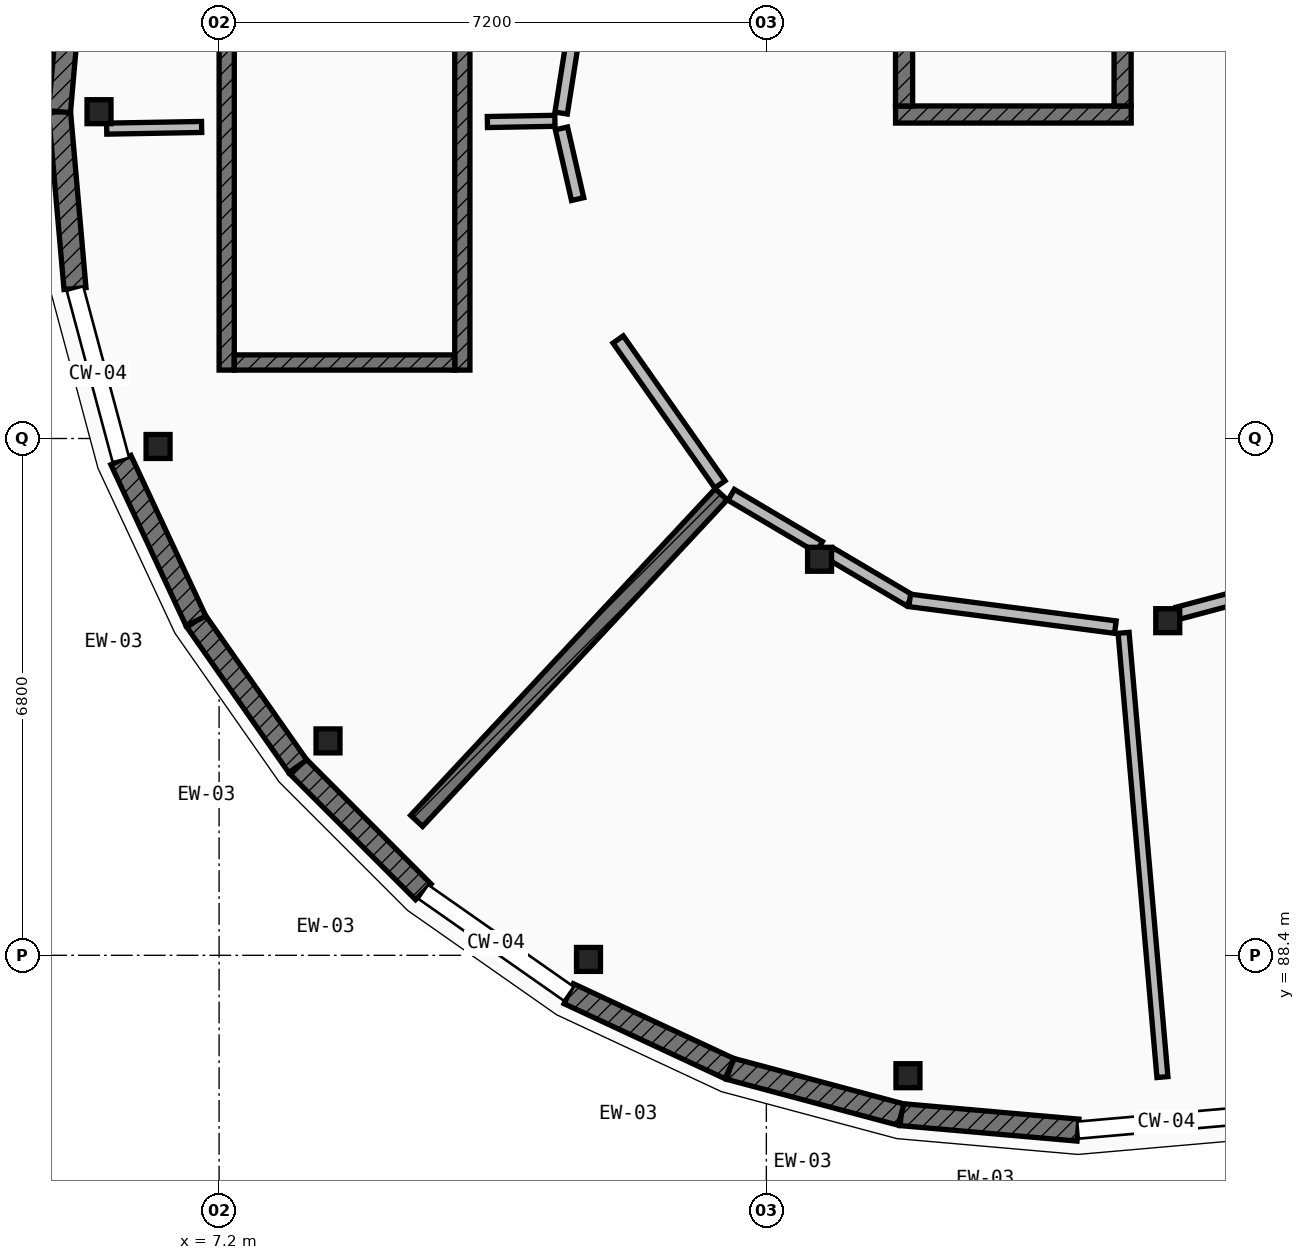
"""IFC4 building model, lengths in metres.
Left out: names, types, materials, properties, quantities, classifications, styles, units other than length and angle.
Written with IfcOpenShell. Run it as: python <this file> out.ifc"""

import sys

from ifc_helpers import new_model, si_unit, direction, frame, frame_2d, origin, origin_2d, place, context, subcontext, project, spatial, rectangle, extrude, element, fill, save


model = new_model("IFC4")
c1 = context("Model", 3, precision=1e-05, world=origin(), true_north=direction((0.0, 1.0)))
c2 = subcontext(c1, "Body", "Model", "MODEL_VIEW")
j1 = project(units=[si_unit("LENGTHUNIT", "METRE"), si_unit("PLANEANGLEUNIT", "RADIAN")], contexts=[c1])
p1 = place(None, origin())
s1 = spatial("IfcSite", under=j1, at=p1, CompositionType="ELEMENT")
p2 = place(p1, origin())
s2 = spatial("IfcBuilding", under=s1, at=p2, CompositionType="ELEMENT")
p3 = place(p2, frame((0.0, 0.0, 12.95)))
s3 = spatial("IfcBuildingStorey", under=s2, at=p3, CompositionType="ELEMENT", Elevation=12.95)
for number, where, z_axis, x_axis in (
    (1, (5.62, 99.5, 0.0), (0.0, 0.0, 1.0), (1.0, 0.0, 0.0)),
    (2, (6.397, 95.095, 0.0), (0.0, 0.0, 1.0), (1.0, 0.0, 0.0)),
    (3, (8.633, 91.221, 0.0), (0.0, 0.0, 1.0), (1.0, 0.0, 0.0)),
    (4, (12.06, 88.346, 0.0), (0.0, 0.0, 1.0), (1.0, 0.0, 0.0)),
    (5, (16.263, 86.816, 0.0), (0.0, 0.0, 1.0), (1.0, 0.0, 0.0)),
    (6, (15.1, 93.611, 0.0), (0.0, 0.0, 1.0), (1.0, 0.0, 0.0)),
    (7, (19.681, 92.803, 0.0), (0.0, 0.0, 1.0), (1.0, 0.0, 0.0)),
):
    element("IfcColumn", number, at=place(p3, frame(where, z_axis=z_axis, x_axis=x_axis)), inside=s3, PredefinedType="COLUMN", context=c2, shape_type="SweptSolid", body=[
        extrude(rectangle(XDim=0.315, YDim=0.315, at=origin_2d()), origin(), (0.0, 0.0, 1.0), 4.2),
    ])
p4 = place(p3, frame((18.5, 86.1, 0.0), z_axis=(0.0, 0.0, 1.0), x_axis=(-0.996184295282, 0.087274565792, 0.0)))
e8 = element("IfcWall", 8, at=p4, inside=s3, PredefinedType="ELEMENTEDWALL", context=c2, shape_type="SweptSolid", body=[
    extrude(rectangle(XDim=2.336, YDim=0.29, at=frame_2d((1.168, 0.0))), origin(), (0.0, 0.0, 1.0), 3.349),
])
p5 = place(p4, frame((0.643, 0.0, 0.85)))
e9 = element("IfcOpeningElement", 9, at=p5, cuts=e8, PredefinedType="OPENING", context=c2, shape_type="SweptSolid", body=[
    extrude(rectangle(XDim=1.05, YDim=2.15, at=frame_2d((0.525, 1.075))), frame((0.0, 0.155, 0.0), z_axis=(0.0, -1.0, 0.0), x_axis=(1.0, 0.0, 0.0)), (0.0, 0.0, 1.0), 0.31),
])
p6 = place(p3, frame((16.173, 86.304, 0.0), z_axis=(0.0, 0.0, 1.0), x_axis=(-0.965981166673, 0.258612423585, 0.0)))
e10 = element("IfcWall", 10, at=p6, inside=s3, PredefinedType="ELEMENTEDWALL", context=c2, shape_type="SweptSolid", body=[
    extrude(rectangle(XDim=2.335, YDim=0.29, at=frame_2d((1.168, 0.0))), origin(), (0.0, 0.0, 1.0), 3.349),
])
p7 = place(p6, frame((0.628, 0.0, 0.85)))
e11 = element("IfcOpeningElement", 11, at=p7, cuts=e10, PredefinedType="OPENING", context=c2, shape_type="SweptSolid", body=[
    extrude(rectangle(XDim=1.08, YDim=1.5, at=frame_2d((0.54, 0.75))), frame((0.0, 0.155, 0.0), z_axis=(0.0, -1.0, 0.0), x_axis=(1.0, 0.0, 0.0)), (0.0, 0.0, 1.0), 0.31),
])
p8 = place(p3, frame((13.917, 86.908, 0.0), z_axis=(0.0, 0.0, 1.0), x_axis=(-0.906321946979, 0.422587894318, 0.0)))
e12 = element("IfcWall", 12, at=p8, inside=s3, PredefinedType="ELEMENTEDWALL", context=c2, shape_type="SweptSolid", body=[
    extrude(rectangle(XDim=2.336, YDim=0.29, at=frame_2d((1.168, 0.0))), origin(), (0.0, 0.0, 1.0), 3.349),
])
p9 = place(p8, frame((0.628, 0.0, 0.85)))
e13 = element("IfcOpeningElement", 13, at=p9, cuts=e12, PredefinedType="OPENING", context=c2, shape_type="SweptSolid", body=[
    extrude(rectangle(XDim=1.08, YDim=1.8, at=frame_2d((0.54, 0.9))), frame((0.0, 0.155, 0.0), z_axis=(0.0, -1.0, 0.0), x_axis=(1.0, 0.0, 0.0)), (0.0, 0.0, 1.0), 0.31),
])
p10 = place(p3, frame((9.887, 89.235, 0.0), z_axis=(0.0, 0.0, 1.0), x_axis=(-0.707106781187, 0.707106781187, 0.0)))
e14 = element("IfcWall", 14, at=p10, inside=s3, PredefinedType="ELEMENTEDWALL", context=c2, shape_type="SweptSolid", body=[
    extrude(rectangle(XDim=2.336, YDim=0.29, at=frame_2d((1.168, 0.0))), origin(), (0.0, 0.0, 1.0), 3.349),
])
p11 = place(p10, frame((0.618, 0.0, 0.85)))
e15 = element("IfcOpeningElement", 15, at=p11, cuts=e14, PredefinedType="OPENING", context=c2, shape_type="SweptSolid", body=[
    extrude(rectangle(XDim=1.1, YDim=1.25, at=frame_2d((0.55, 0.625))), frame((0.0, 0.155, 0.0), z_axis=(0.0, -1.0, 0.0), x_axis=(1.0, 0.0, 0.0)), (0.0, 0.0, 1.0), 0.31),
])
p12 = place(p3, frame((8.235, 90.887, 0.0), z_axis=(0.0, 0.0, 1.0), x_axis=(-0.573728883722, 0.819045278347, 0.0)))
e16 = element("IfcWall", 16, at=p12, inside=s3, PredefinedType="ELEMENTEDWALL", context=c2, shape_type="SweptSolid", body=[
    extrude(rectangle(XDim=2.336, YDim=0.29, at=frame_2d((1.168, 0.0))), origin(), (0.0, 0.0, 1.0), 3.349),
])
p13 = place(p12, frame((0.618, 0.0, 0.85)))
e17 = element("IfcOpeningElement", 17, at=p13, cuts=e16, PredefinedType="OPENING", context=c2, shape_type="SweptSolid", body=[
    extrude(rectangle(XDim=1.1, YDim=1.5, at=frame_2d((0.55, 0.75))), frame((0.0, 0.155, 0.0), z_axis=(0.0, -1.0, 0.0), x_axis=(1.0, 0.0, 0.0)), (0.0, 0.0, 1.0), 0.31),
])
p14 = place(p3, frame((6.895, 92.8, 0.0), z_axis=(0.0, 0.0, 1.0), x_axis=(-0.422587894318, 0.906321946979, 0.0)))
e18 = element("IfcWall", 18, at=p14, inside=s3, PredefinedType="ELEMENTEDWALL", context=c2, shape_type="SweptSolid", body=[
    extrude(rectangle(XDim=2.336, YDim=0.29, at=frame_2d((1.168, 0.0))), origin(), (0.0, 0.0, 1.0), 3.349),
])
p15 = place(p14, frame((0.618, 0.0, 0.85)))
e19 = element("IfcOpeningElement", 19, at=p15, cuts=e18, PredefinedType="OPENING", context=c2, shape_type="SweptSolid", body=[
    extrude(rectangle(XDim=1.1, YDim=1.85, at=frame_2d((0.55, 0.925))), frame((0.0, 0.155, 0.0), z_axis=(0.0, -1.0, 0.0), x_axis=(1.0, 0.0, 0.0)), (0.0, 0.0, 1.0), 0.31),
])
for number, where, z_axis, x_axis in (
    (20, (5.304, 97.173, 0.0), (0.0, 0.0, 1.0), (-0.087, 0.996, 0.0)),
    (21, (5.1, 99.5, 0.0), (0.0, 0.0, 1.0), (0.087, 0.996, 0.0)),
):
    element("IfcWall", number, at=place(p3, frame(where, z_axis=z_axis, x_axis=x_axis)), inside=s3, PredefinedType="ELEMENTEDWALL", context=c2, shape_type="SweptSolid", body=[
        extrude(rectangle(XDim=2.336, YDim=0.29, at=frame_2d((1.168, 0.0))), origin(), (0.0, 0.0, 1.0), 3.349),
    ])
p16 = place(p3, frame((10.4, 96.1, 0.0), z_axis=(0.0, 0.0, 1.0), x_axis=(0.0, 1.0, 0.0)))
e22 = element("IfcWall", 22, at=p16, inside=s3, PredefinedType="SHEAR", context=c2, shape_type="SweptSolid", body=[
    extrude(rectangle(XDim=6.8, YDim=0.2, at=frame_2d((3.4, 0.0))), origin(), (0.0, 0.0, 1.0), 3.995),
])
p17 = place(p16, frame((0.38, 0.0, 0.0)))
e23 = element("IfcOpeningElement", 23, at=p17, cuts=e22, PredefinedType="OPENING", context=c2, shape_type="SweptSolid", body=[
    extrude(rectangle(XDim=1.05, YDim=2.15, at=frame_2d((0.525, 1.075))), frame((0.0, 0.11, 0.0), z_axis=(0.0, -1.0, 0.0), x_axis=(1.0, 0.0, 0.0)), (0.0, 0.0, 1.0), 0.22),
])
p18 = place(p3, frame((7.3, 96.1, 0.0), z_axis=(0.0, 0.0, 1.0), x_axis=(0.0, 1.0, 0.0)))
e24 = element("IfcWall", 24, at=p18, inside=s3, PredefinedType="SHEAR", context=c2, shape_type="SweptSolid", body=[
    extrude(rectangle(XDim=6.8, YDim=0.2, at=frame_2d((3.4, 0.0))), origin(), (0.0, 0.0, 1.0), 3.995),
])
p19 = place(p3, frame((10.3, 96.2, 0.0), z_axis=(0.0, 0.0, 1.0), x_axis=(-1.0, 0.0, 0.0)))
e25 = element("IfcWall", 25, at=p19, inside=s3, PredefinedType="SHEAR", context=c2, shape_type="SweptSolid", body=[
    extrude(rectangle(XDim=2.9, YDim=0.2, at=frame_2d((1.45, 0.0))), origin(), (0.0, 0.0, 1.0), 3.995),
])
p20 = place(p3, frame((16.1, 99.463, 0.0), z_axis=(0.0, 0.0, 1.0), x_axis=(1.0, 0.0, 0.0)))
e26 = element("IfcWall", 26, at=p20, inside=s3, PredefinedType="SHEAR", context=c2, shape_type="SweptSolid", body=[
    extrude(rectangle(XDim=3.1, YDim=0.225, at=frame_2d((1.55, 0.0))), origin(), (0.0, 0.0, 1.0), 3.995),
])
p21 = place(p20, frame((0.95, 0.0, 0.0)))
e27 = element("IfcOpeningElement", 27, at=p21, cuts=e26, PredefinedType="OPENING", context=c2, shape_type="SweptSolid", body=[
    extrude(rectangle(XDim=1.2, YDim=2.2, at=frame_2d((0.6, 1.1))), frame((0.0, 0.123, 0.0), z_axis=(0.0, -1.0, 0.0), x_axis=(1.0, 0.0, 0.0)), (0.0, 0.0, 1.0), 0.245),
])
for number, where, z_axis, x_axis in (
    (28, (16.212, 99.575, 0.0), (0.0, 0.0, 1.0), (0.0, 1.0, 0.0)),
    (29, (19.087, 99.575, 0.0), (0.0, 0.0, 1.0), (0.0, 1.0, 0.0)),
):
    element("IfcWall", number, at=place(p3, frame(where, z_axis=z_axis, x_axis=x_axis)), inside=s3, PredefinedType="SHEAR", context=c2, shape_type="SweptSolid", body=[
        extrude(rectangle(XDim=2.15, YDim=0.225, at=frame_2d((1.075, 0.0))), origin(), (0.0, 0.0, 1.0), 3.995),
    ])
p22 = place(p3, frame((11.618, 99.38, 0.0), z_axis=(0.0, 0.0, 1.0), x_axis=(-0.999840336335, -0.017869018934, 0.0)))
e30 = element("IfcWall", 30, at=p22, inside=s3, PredefinedType="PARTITIONING", context=c2, shape_type="SweptSolid", body=[
    extrude(rectangle(XDim=0.888, YDim=0.145, at=frame_2d((0.444, 0.0))), origin(), (0.0, 0.0, 1.0), 3.324),
])
p23 = place(p3, frame((6.97, 99.299, 0.0), z_axis=(0.0, 0.0, 1.0), x_axis=(-0.999845298985, -0.017589147167, 0.0)))
e31 = element("IfcWall", 31, at=p23, inside=s3, PredefinedType="PARTITIONING", context=c2, shape_type="SweptSolid", body=[
    extrude(rectangle(XDim=1.249, YDim=0.145, at=frame_2d((0.625, 0.0))), origin(), (0.0, 0.0, 1.0), 3.324),
])
p24 = place(p3, frame((13.806, 94.466, 0.0), z_axis=(0.0, 0.0, 1.0), x_axis=(-0.681971732264, -0.731378531537, 0.0)))
e32 = element("IfcWall", 32, at=p24, inside=s3, PredefinedType="SOLIDWALL", context=c2, shape_type="SweptSolid", body=[
    extrude(rectangle(XDim=5.875, YDim=0.215, at=frame_2d((2.938, 0.0))), origin(), (0.0, 0.0, 1.0), 3.324),
])
p25 = place(p3, frame((19.1, 92.643, 0.0), z_axis=(0.0, 0.0, 1.0), x_axis=(0.087091071421, -0.996200353984, 0.0)))
e33 = element("IfcWall", 33, at=p25, inside=s3, PredefinedType="PARTITIONING", context=c2, shape_type="SweptSolid", body=[
    extrude(rectangle(XDim=5.867, YDim=0.145, at=frame_2d((2.934, 0.0))), origin(), (0.0, 0.0, 1.0), 3.324),
])
p26 = place(p3, frame((12.033, 101.601, 0.0), z_axis=(0.0, 0.0, 1.0), x_axis=(-0.155237833992, -0.987877125404, 0.0)))
e34 = element("IfcWall", 34, at=p26, inside=s3, PredefinedType="PARTITIONING", context=c2, shape_type="SweptSolid", body=[
    extrude(rectangle(XDim=2.145, YDim=0.165, at=frame_2d((1.073, 0.0))), origin(), (0.0, 0.0, 1.0), 3.324),
])
p27 = place(p3, frame((11.704, 99.28, 0.0), z_axis=(0.0, 0.0, 1.0), x_axis=(0.223158332348, -0.974782210909, 0.0)))
e35 = element("IfcWall", 35, at=p27, inside=s3, PredefinedType="PARTITIONING", context=c2, shape_type="SweptSolid", body=[
    extrude(rectangle(XDim=0.954, YDim=0.165, at=frame_2d((0.477, 0.0))), origin(), (0.0, 0.0, 1.0), 3.324),
])
p28 = place(p3, frame((12.45, 96.503, 0.0), z_axis=(0.0, 0.0, 1.0), x_axis=(0.574678200401, -0.818379475539, 0.0)))
e36 = element("IfcWall", 36, at=p28, inside=s3, PredefinedType="PARTITIONING", context=c2, shape_type="SweptSolid", body=[
    extrude(rectangle(XDim=2.33, YDim=0.165, at=frame_2d((1.165, 0.0))), origin(), (0.0, 0.0, 1.0), 3.324),
])
p29 = place(p28, frame((0.495, 0.0, 0.0)))
e37 = element("IfcOpeningElement", 37, at=p29, cuts=e36, PredefinedType="OPENING", context=c2, shape_type="SweptSolid", body=[
    extrude(rectangle(XDim=1.34, YDim=2.32, at=frame_2d((0.67, 1.16))), frame((0.0, 0.093, 0.0), z_axis=(0.0, -1.0, 0.0), x_axis=(1.0, 0.0, 0.0)), (0.0, 0.0, 1.0), 0.185),
])
p30 = place(p3, frame((13.937, 94.459, 0.0), z_axis=(0.0, 0.0, 1.0), x_axis=(0.860532897503, -0.509394868756, 0.0)))
e38 = element("IfcWall", 38, at=p30, inside=s3, PredefinedType="PARTITIONING", context=c2, shape_type="SweptSolid", body=[
    extrude(rectangle(XDim=1.347, YDim=0.165, at=frame_2d((0.673, 0.0))), origin(), (0.0, 0.0, 1.0), 3.324),
])
p31 = place(p30, frame((0.224, 0.0, 0.0)))
e39 = element("IfcOpeningElement", 39, at=p31, cuts=e38, PredefinedType="OPENING", context=c2, shape_type="SweptSolid", body=[
    extrude(rectangle(XDim=0.9, YDim=2.1, at=frame_2d((0.45, 1.05))), frame((0.0, 0.093, 0.0), z_axis=(0.0, -1.0, 0.0), x_axis=(1.0, 0.0, 0.0)), (0.0, 0.0, 1.0), 0.185),
])
p32 = place(p3, frame((15.244, 93.686, 0.0), z_axis=(0.0, 0.0, 1.0), x_axis=(0.860838176747, -0.508878800359, 0.0)))
e40 = element("IfcWall", 40, at=p32, inside=s3, PredefinedType="PARTITIONING", context=c2, shape_type="SweptSolid", body=[
    extrude(rectangle(XDim=1.21, YDim=0.165, at=frame_2d((0.605, 0.0))), origin(), (0.0, 0.0, 1.0), 3.324),
])
p33 = place(p3, frame((16.286, 93.07, 0.0), z_axis=(0.0, 0.0, 1.0), x_axis=(0.991643260492, -0.12901024735, 0.0)))
e41 = element("IfcWall", 41, at=p33, inside=s3, PredefinedType="PARTITIONING", context=c2, shape_type="SweptSolid", body=[
    extrude(rectangle(XDim=2.729, YDim=0.165, at=frame_2d((1.364, 0.0))), origin(), (0.0, 0.0, 1.0), 3.324),
])
p34 = place(p3, frame((19.811, 92.9, 0.0), z_axis=(0.0, 0.0, 1.0), x_axis=(0.966208027206, 0.257763550882, 0.0)))
e42 = element("IfcWall", 42, at=p34, inside=s3, PredefinedType="PARTITIONING", context=c2, shape_type="SweptSolid", body=[
    extrude(rectangle(XDim=1.506, YDim=0.165, at=frame_2d((0.753, 0.0))), origin(), (0.0, 0.0, 1.0), 3.324),
])
p35 = place(p34, frame((0.293, 0.0, 0.0)))
e43 = element("IfcOpeningElement", 43, at=p35, cuts=e42, PredefinedType="OPENING", context=c2, shape_type="SweptSolid", body=[
    extrude(rectangle(XDim=0.92, YDim=2.12, at=frame_2d((0.46, 1.06))), frame((0.0, 0.093, 0.0), z_axis=(0.0, -1.0, 0.0), x_axis=(1.0, 0.0, 0.0)), (0.0, 0.0, 1.0), 0.185),
])
p36 = place(p5, origin())
e44 = element("IfcWindow", 44, at=p36, inside=s3, PartitioningType="SINGLE_PANEL", PredefinedType="WINDOW", context=c2, shape_type="SweptSolid", body=[
    extrude(rectangle(XDim=1.05, YDim=2.15, at=frame_2d((0.525, 1.075))), frame((0.0, 0.03, 0.0), z_axis=(0.0, -1.0, 0.0), x_axis=(1.0, 0.0, 0.0)), (0.0, 0.0, 1.0), 0.06),
])
fill(e9, e44)
p37 = place(p7, origin())
e45 = element("IfcWindow", 45, at=p37, inside=s3, PartitioningType="SINGLE_PANEL", PredefinedType="WINDOW", context=c2, shape_type="SweptSolid", body=[
    extrude(rectangle(XDim=1.08, YDim=1.5, at=frame_2d((0.54, 0.75))), frame((0.0, 0.03, 0.0), z_axis=(0.0, -1.0, 0.0), x_axis=(1.0, 0.0, 0.0)), (0.0, 0.0, 1.0), 0.06),
])
fill(e11, e45)
p38 = place(p9, origin())
e46 = element("IfcWindow", 46, at=p38, inside=s3, PartitioningType="SINGLE_PANEL", PredefinedType="WINDOW", context=c2, shape_type="SweptSolid", body=[
    extrude(rectangle(XDim=1.08, YDim=1.8, at=frame_2d((0.54, 0.9))), frame((0.0, 0.03, 0.0), z_axis=(0.0, -1.0, 0.0), x_axis=(1.0, 0.0, 0.0)), (0.0, 0.0, 1.0), 0.06),
])
fill(e13, e46)
p39 = place(p11, origin())
e47 = element("IfcWindow", 47, at=p39, inside=s3, PartitioningType="SINGLE_PANEL", PredefinedType="WINDOW", context=c2, shape_type="SweptSolid", body=[
    extrude(rectangle(XDim=1.1, YDim=1.25, at=frame_2d((0.55, 0.625))), frame((0.0, 0.03, 0.0), z_axis=(0.0, -1.0, 0.0), x_axis=(1.0, 0.0, 0.0)), (0.0, 0.0, 1.0), 0.06),
])
fill(e15, e47)
p40 = place(p13, origin())
e48 = element("IfcWindow", 48, at=p40, inside=s3, PartitioningType="SINGLE_PANEL", PredefinedType="WINDOW", context=c2, shape_type="SweptSolid", body=[
    extrude(rectangle(XDim=1.1, YDim=1.5, at=frame_2d((0.55, 0.75))), frame((0.0, 0.03, 0.0), z_axis=(0.0, -1.0, 0.0), x_axis=(1.0, 0.0, 0.0)), (0.0, 0.0, 1.0), 0.06),
])
fill(e17, e48)
p41 = place(p15, origin())
e49 = element("IfcWindow", 49, at=p41, inside=s3, PartitioningType="SINGLE_PANEL", PredefinedType="WINDOW", context=c2, shape_type="SweptSolid", body=[
    extrude(rectangle(XDim=1.1, YDim=1.85, at=frame_2d((0.55, 0.925))), frame((0.0, 0.03, 0.0), z_axis=(0.0, -1.0, 0.0), x_axis=(1.0, 0.0, 0.0)), (0.0, 0.0, 1.0), 0.06),
])
fill(e19, e49)
p42 = place(p17, origin())
e50 = element("IfcDoor", 50, at=p42, inside=s3, OperationType="SINGLE_SWING_RIGHT", PredefinedType="DOOR", context=c2, shape_type="SweptSolid", body=[
    extrude(rectangle(XDim=1.05, YDim=2.15, at=frame_2d((0.525, 1.075))), frame((0.0, 0.025, 0.0), z_axis=(0.0, -1.0, 0.0), x_axis=(1.0, 0.0, 0.0)), (0.0, 0.0, 1.0), 0.05),
])
fill(e23, e50)
p43 = place(p21, origin())
e51 = element("IfcDoor", 51, at=p43, inside=s3, OperationType="DOUBLE_DOOR_SLIDING", PredefinedType="DOOR", context=c2, shape_type="SweptSolid", body=[
    extrude(rectangle(XDim=1.2, YDim=2.2, at=frame_2d((0.6, 1.1))), frame((0.0, 0.025, 0.0), z_axis=(0.0, -1.0, 0.0), x_axis=(1.0, 0.0, 0.0)), (0.0, 0.0, 1.0), 0.05),
])
fill(e27, e51)
p44 = place(p29, origin())
e52 = element("IfcDoor", 52, at=p44, inside=s3, OperationType="SINGLE_SWING_LEFT", PredefinedType="DOOR", context=c2, shape_type="SweptSolid", body=[
    extrude(rectangle(XDim=1.34, YDim=2.32, at=frame_2d((0.67, 1.16))), frame((0.0, 0.025, 0.0), z_axis=(0.0, -1.0, 0.0), x_axis=(1.0, 0.0, 0.0)), (0.0, 0.0, 1.0), 0.05),
])
fill(e37, e52)
p45 = place(p31, origin())
e53 = element("IfcDoor", 53, at=p45, inside=s3, OperationType="SINGLE_SWING_RIGHT", PredefinedType="DOOR", context=c2, shape_type="SweptSolid", body=[
    extrude(rectangle(XDim=0.9, YDim=2.1, at=frame_2d((0.45, 1.05))), frame((0.0, 0.025, 0.0), z_axis=(0.0, -1.0, 0.0), x_axis=(1.0, 0.0, 0.0)), (0.0, 0.0, 1.0), 0.05),
])
fill(e39, e53)
p46 = place(p35, origin())
e54 = element("IfcDoor", 54, at=p46, inside=s3, OperationType="SINGLE_SWING_LEFT", PredefinedType="DOOR", context=c2, shape_type="SweptSolid", body=[
    extrude(rectangle(XDim=0.92, YDim=2.12, at=frame_2d((0.46, 1.06))), frame((0.0, 0.025, 0.0), z_axis=(0.0, -1.0, 0.0), x_axis=(1.0, 0.0, 0.0)), (0.0, 0.0, 1.0), 0.05),
])
fill(e43, e54)
save(model, sys.argv[1])
